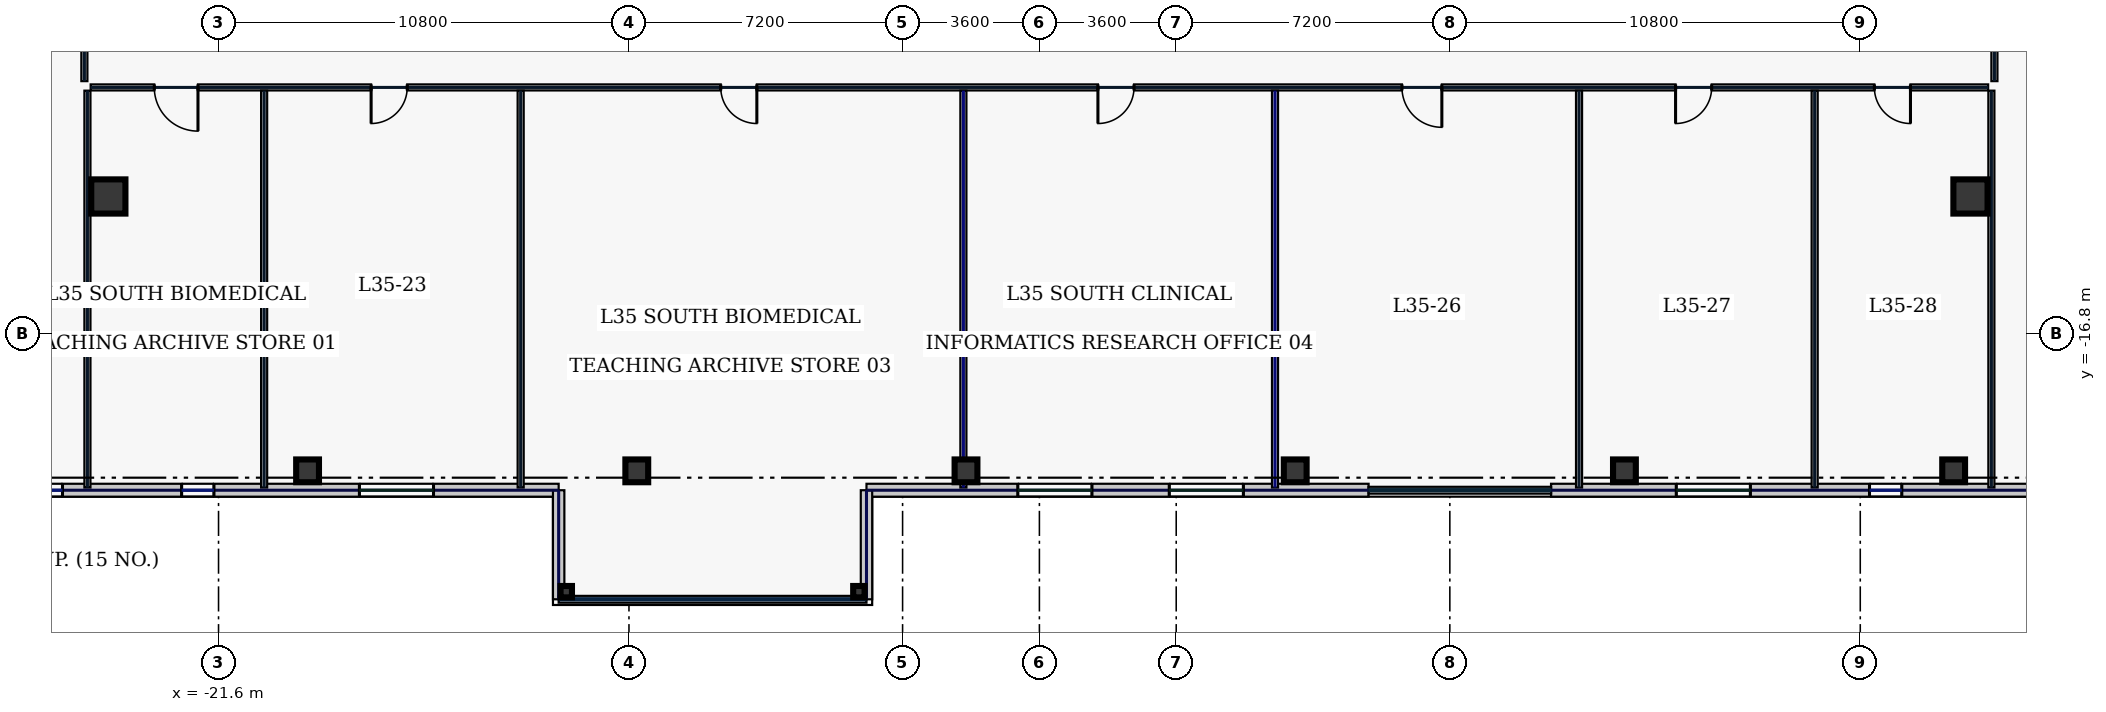
"""IFC4 building model, lengths in metres.
Left out: names, types, materials, properties, quantities, classifications, styles, units other than length and angle.
Written with IfcOpenShell. Run it as: python <this file> out.ifc"""

import sys

from ifc_helpers import new_model, si_unit, direction, frame, frame_2d, origin, origin_2d, place, context, subcontext, project, spatial, rectangle, hollow_rectangle, extrude, element, fill, save


model = new_model("IFC4")
c1 = context("Model", 3, precision=1e-05, world=origin(), true_north=direction((0.0, 1.0)))
c2 = subcontext(c1, "Body", "Model", "MODEL_VIEW")
j1 = project(units=[si_unit("LENGTHUNIT", "METRE"), si_unit("PLANEANGLEUNIT", "RADIAN")], contexts=[c1])
p1 = place(None, origin())
s1 = spatial("IfcSite", under=j1, at=p1, CompositionType="ELEMENT")
p2 = place(p1, origin())
s2 = spatial("IfcBuilding", under=s1, at=p2, CompositionType="ELEMENT")
p3 = place(p2, frame((0.0, 0.0, 156.2)))
s3 = spatial("IfcBuildingStorey", under=s2, at=p3, CompositionType="ELEMENT", Elevation=156.2)
for number, where, z_axis, x_axis in (
    (1, (-24.5, -13.2, 0.0), (0.0, 0.0, 1.0), (1.0, 0.0, 0.0)),
    (2, (24.5, -13.2, 0.0), (0.0, 0.0, 1.0), (1.0, 0.0, 0.0)),
):
    element("IfcColumn", number, at=place(p3, frame(where, z_axis=z_axis, x_axis=x_axis)), inside=s3, PredefinedType="COLUMN", context=c2, shape_type="SweptSolid", body=[
        extrude(hollow_rectangle(XDim=0.9, YDim=0.9, WallThickness=0.04, at=origin_2d()), origin(), (0.0, 0.0, 1.0), 3.74),
    ])
for number, where, z_axis, x_axis in (
    (3, (-19.257, -20.42, 0.0), (0.0, 0.0, 1.0), (1.0, 0.0, 0.0)),
    (4, (-10.594, -20.42, 0.0), (0.0, 0.0, 1.0), (1.0, 0.0, 0.0)),
    (5, (-1.931, -20.42, 0.0), (0.0, 0.0, 1.0), (1.0, 0.0, 0.0)),
    (6, (6.731, -20.42, 0.0), (0.0, 0.0, 1.0), (1.0, 0.0, 0.0)),
    (7, (15.394, -20.42, 0.0), (0.0, 0.0, 1.0), (1.0, 0.0, 0.0)),
    (8, (24.057, -20.42, 0.0), (0.0, 0.0, 1.0), (1.0, 0.0, 0.0)),
):
    element("IfcColumn", number, at=place(p3, frame(where, z_axis=z_axis, x_axis=x_axis)), inside=s3, PredefinedType="COLUMN", context=c2, shape_type="SweptSolid", body=[
        extrude(hollow_rectangle(XDim=0.6, YDim=0.6, WallThickness=0.028, at=origin_2d()), origin(), (0.0, 0.0, 1.0), 3.74),
    ])
for number, where, z_axis, x_axis in (
    (9, (-12.45, -23.6, 0.0), (0.0, 0.0, 1.0), (1.0, 0.0, 0.0)),
    (10, (-4.75, -23.6, 0.0), (0.0, 0.0, 1.0), (1.0, 0.0, 0.0)),
):
    element("IfcColumn", number, at=place(p3, frame(where, z_axis=z_axis, x_axis=x_axis)), inside=s3, PredefinedType="COLUMN", context=c2, shape_type="SweptSolid", body=[
        extrude(hollow_rectangle(XDim=0.3, YDim=0.3, WallThickness=0.016, at=origin_2d()), origin(), (0.0, 0.0, 1.0), 3.74),
    ])
p4 = place(p3, frame((-28.6, -20.93, 0.0), z_axis=(0.0, 0.0, 1.0), x_axis=(1.0, 0.0, 0.0)))
e11 = element("IfcWall", 11, at=p4, inside=s3, PredefinedType="STANDARD", context=c2, shape_type="SweptSolid", body=[
    extrude(rectangle(XDim=15.95, YDim=0.34, at=frame_2d((7.975, 0.0))), origin(), (0.0, 0.0, 1.0), 3.74),
])
p5 = place(p4, frame((2.044, 0.0, 0.8)))
e12 = element("IfcOpeningElement", 12, at=p5, cuts=e11, PredefinedType="OPENING", context=c2, shape_type="SweptSolid", body=[
    extrude(rectangle(XDim=0.85, YDim=1.85, at=frame_2d((0.425, 0.925))), frame((0.0, 0.18, 0.0), z_axis=(0.0, -1.0, 0.0), x_axis=(1.0, 0.0, 0.0)), (0.0, 0.0, 1.0), 0.36),
])
p6 = place(p4, frame((6.029, 0.0, 0.8)))
e13 = element("IfcOpeningElement", 13, at=p6, cuts=e11, PredefinedType="OPENING", context=c2, shape_type="SweptSolid", body=[
    extrude(rectangle(XDim=0.85, YDim=1.85, at=frame_2d((0.425, 0.925))), frame((0.0, 0.18, 0.0), z_axis=(0.0, -1.0, 0.0), x_axis=(1.0, 0.0, 0.0)), (0.0, 0.0, 1.0), 0.36),
])
p7 = place(p4, frame((10.707, 0.0, 0.8)))
e14 = element("IfcOpeningElement", 14, at=p7, cuts=e11, PredefinedType="OPENING", context=c2, shape_type="SweptSolid", body=[
    extrude(rectangle(XDim=1.95, YDim=2.1, at=frame_2d((0.975, 1.05))), frame((0.0, 0.18, 0.0), z_axis=(0.0, -1.0, 0.0), x_axis=(1.0, 0.0, 0.0)), (0.0, 0.0, 1.0), 0.36),
])
p8 = place(p3, frame((-4.55, -20.93, 0.0), z_axis=(0.0, 0.0, 1.0), x_axis=(1.0, 0.0, 0.0)))
e15 = element("IfcWall", 15, at=p8, inside=s3, PredefinedType="STANDARD", context=c2, shape_type="SweptSolid", body=[
    extrude(rectangle(XDim=13.213, YDim=0.34, at=frame_2d((6.606, 0.0))), origin(), (0.0, 0.0, 1.0), 3.74),
])
p9 = place(p8, frame((3.983, 0.0, 0.8)))
e16 = element("IfcOpeningElement", 16, at=p9, cuts=e15, PredefinedType="OPENING", context=c2, shape_type="SweptSolid", body=[
    extrude(rectangle(XDim=1.95, YDim=2.1, at=frame_2d((0.975, 1.05))), frame((0.0, 0.18, 0.0), z_axis=(0.0, -1.0, 0.0), x_axis=(1.0, 0.0, 0.0)), (0.0, 0.0, 1.0), 0.36),
])
p10 = place(p8, frame((7.967, 0.0, 0.8)))
e17 = element("IfcOpeningElement", 17, at=p10, cuts=e15, PredefinedType="OPENING", context=c2, shape_type="SweptSolid", body=[
    extrude(rectangle(XDim=1.95, YDim=2.1, at=frame_2d((0.975, 1.05))), frame((0.0, 0.18, 0.0), z_axis=(0.0, -1.0, 0.0), x_axis=(1.0, 0.0, 0.0)), (0.0, 0.0, 1.0), 0.36),
])
p11 = place(p3, frame((13.463, -20.93, 0.0), z_axis=(0.0, 0.0, 1.0), x_axis=(1.0, 0.0, 0.0)))
e18 = element("IfcWall", 18, at=p11, inside=s3, PredefinedType="STANDARD", context=c2, shape_type="SweptSolid", body=[
    extrude(rectangle(XDim=19.937, YDim=0.34, at=frame_2d((9.969, 0.0))), origin(), (0.0, 0.0, 1.0), 3.74),
])
p12 = place(p11, frame((3.295, 0.0, 0.8)))
e19 = element("IfcOpeningElement", 19, at=p12, cuts=e18, PredefinedType="OPENING", context=c2, shape_type="SweptSolid", body=[
    extrude(rectangle(XDim=1.95, YDim=2.1, at=frame_2d((0.975, 1.05))), frame((0.0, 0.18, 0.0), z_axis=(0.0, -1.0, 0.0), x_axis=(1.0, 0.0, 0.0)), (0.0, 0.0, 1.0), 0.36),
])
p13 = place(p11, frame((8.38, 0.0, 0.8)))
e20 = element("IfcOpeningElement", 20, at=p13, cuts=e18, PredefinedType="OPENING", context=c2, shape_type="SweptSolid", body=[
    extrude(rectangle(XDim=0.85, YDim=1.85, at=frame_2d((0.425, 0.925))), frame((0.0, 0.18, 0.0), z_axis=(0.0, -1.0, 0.0), x_axis=(1.0, 0.0, 0.0)), (0.0, 0.0, 1.0), 0.36),
])
p14 = place(p11, frame((13.058, 0.0, 0.8)))
e21 = element("IfcOpeningElement", 21, at=p14, cuts=e18, PredefinedType="OPENING", context=c2, shape_type="SweptSolid", body=[
    extrude(rectangle(XDim=0.85, YDim=1.85, at=frame_2d((0.425, 0.925))), frame((0.0, 0.18, 0.0), z_axis=(0.0, -1.0, 0.0), x_axis=(1.0, 0.0, 0.0)), (0.0, 0.0, 1.0), 0.36),
])
p15 = place(p11, frame((15.943, 0.0, 0.8)))
e22 = element("IfcOpeningElement", 22, at=p15, cuts=e18, PredefinedType="OPENING", context=c2, shape_type="SweptSolid", body=[
    extrude(rectangle(XDim=1.95, YDim=2.1, at=frame_2d((0.975, 1.05))), frame((0.0, 0.18, 0.0), z_axis=(0.0, -1.0, 0.0), x_axis=(1.0, 0.0, 0.0)), (0.0, 0.0, 1.0), 0.36),
])
for number, where, z_axis, x_axis in (
    (23, (-12.65, -20.93, 0.0), (0.0, 0.0, 1.0), (0.0, -1.0, 0.0)),
    (24, (-4.55, -20.93, 0.0), (0.0, 0.0, 1.0), (0.0, -1.0, 0.0)),
):
    element("IfcWall", number, at=place(p3, frame(where, z_axis=z_axis, x_axis=x_axis)), inside=s3, PredefinedType="STANDARD", context=c2, shape_type="SweptSolid", body=[
        extrude(rectangle(XDim=2.87, YDim=0.3, at=frame_2d((1.435, 0.0))), origin(), (0.0, 0.0, 1.0), 1.535),
    ])
p16 = place(p3, frame((-25.13, -10.165, 0.0), z_axis=(0.0, 0.0, 1.0), x_axis=(0.0, 1.0, 0.0)))
e25 = element("IfcWall", 25, at=p16, inside=s3, PredefinedType="PARTITIONING", context=c2, shape_type="SweptSolid", body=[
    extrude(rectangle(XDim=2.98, YDim=0.16, at=frame_2d((1.49, 0.0))), origin(), (0.0, 0.0, 1.0), 3.74),
])
p17 = place(p16, frame((1.1, 0.0, 0.0)))
e26 = element("IfcOpeningElement", 26, at=p17, cuts=e25, PredefinedType="OPENING", context=c2, shape_type="SweptSolid", body=[
    extrude(rectangle(XDim=0.95, YDim=2.2, at=frame_2d((0.475, 1.1))), frame((0.0, 0.09, 0.0), z_axis=(0.0, -1.0, 0.0), x_axis=(1.0, 0.0, 0.0)), (0.0, 0.0, 1.0), 0.18),
])
p18 = place(p3, frame((25.13, -7.185, 0.0), z_axis=(0.0, 0.0, 1.0), x_axis=(0.0, -1.0, 0.0)))
e27 = element("IfcWall", 27, at=p18, inside=s3, PredefinedType="PARTITIONING", context=c2, shape_type="SweptSolid", body=[
    extrude(rectangle(XDim=2.98, YDim=0.16, at=frame_2d((1.49, 0.0))), origin(), (0.0, 0.0, 1.0), 3.74),
])
p19 = place(p18, frame((1.1, 0.0, 0.0)))
e28 = element("IfcOpeningElement", 28, at=p19, cuts=e27, PredefinedType="OPENING", context=c2, shape_type="SweptSolid", body=[
    extrude(rectangle(XDim=0.95, YDim=2.2, at=frame_2d((0.475, 1.1))), frame((0.0, 0.09, 0.0), z_axis=(0.0, -1.0, 0.0), x_axis=(1.0, 0.0, 0.0)), (0.0, 0.0, 1.0), 0.18),
])
p20 = place(p3, frame((24.965, -10.33, 0.0), z_axis=(0.0, 0.0, 1.0), x_axis=(-1.0, 0.0, 0.0)))
e29 = element("IfcWall", 29, at=p20, inside=s3, PredefinedType="PARTITIONING", context=c2, shape_type="SweptSolid", body=[
    extrude(rectangle(XDim=49.93, YDim=0.16, at=frame_2d((24.965, 0.0))), origin(), (0.0, 0.0, 1.0), 3.74),
])
p21 = place(p20, frame((47.106, 0.0, 0.0)))
e30 = element("IfcOpeningElement", 30, at=p21, cuts=e29, PredefinedType="OPENING", context=c2, shape_type="SweptSolid", body=[
    extrude(rectangle(XDim=1.15, YDim=2.2, at=frame_2d((0.575, 1.1))), frame((0.0, 0.09, 0.0), z_axis=(0.0, -1.0, 0.0), x_axis=(1.0, 0.0, 0.0)), (0.0, 0.0, 1.0), 0.18),
])
p22 = place(p20, frame((41.6, 0.0, 0.0)))
e31 = element("IfcOpeningElement", 31, at=p22, cuts=e29, PredefinedType="OPENING", context=c2, shape_type="SweptSolid", body=[
    extrude(rectangle(XDim=0.95, YDim=2.2, at=frame_2d((0.475, 1.1))), frame((0.0, 0.09, 0.0), z_axis=(0.0, -1.0, 0.0), x_axis=(1.0, 0.0, 0.0)), (0.0, 0.0, 1.0), 0.18),
])
p23 = place(p20, frame((32.4, 0.0, 0.0)))
e32 = element("IfcOpeningElement", 32, at=p23, cuts=e29, PredefinedType="OPENING", context=c2, shape_type="SweptSolid", body=[
    extrude(rectangle(XDim=0.95, YDim=2.2, at=frame_2d((0.475, 1.1))), frame((0.0, 0.09, 0.0), z_axis=(0.0, -1.0, 0.0), x_axis=(1.0, 0.0, 0.0)), (0.0, 0.0, 1.0), 0.18),
])
p24 = place(p20, frame((22.475, 0.0, 0.0)))
e33 = element("IfcOpeningElement", 33, at=p24, cuts=e29, PredefinedType="OPENING", context=c2, shape_type="SweptSolid", body=[
    extrude(rectangle(XDim=0.95, YDim=2.2, at=frame_2d((0.475, 1.1))), frame((0.0, 0.09, 0.0), z_axis=(0.0, -1.0, 0.0), x_axis=(1.0, 0.0, 0.0)), (0.0, 0.0, 1.0), 0.18),
])
p25 = place(p20, frame((14.375, 0.0, 0.0)))
e34 = element("IfcOpeningElement", 34, at=p25, cuts=e29, PredefinedType="OPENING", context=c2, shape_type="SweptSolid", body=[
    extrude(rectangle(XDim=1.05, YDim=2.2, at=frame_2d((0.525, 1.1))), frame((0.0, 0.09, 0.0), z_axis=(0.0, -1.0, 0.0), x_axis=(1.0, 0.0, 0.0)), (0.0, 0.0, 1.0), 0.18),
])
p26 = place(p20, frame((7.275, 0.0, 0.0)))
e35 = element("IfcOpeningElement", 35, at=p26, cuts=e29, PredefinedType="OPENING", context=c2, shape_type="SweptSolid", body=[
    extrude(rectangle(XDim=0.95, YDim=2.2, at=frame_2d((0.475, 1.1))), frame((0.0, 0.09, 0.0), z_axis=(0.0, -1.0, 0.0), x_axis=(1.0, 0.0, 0.0)), (0.0, 0.0, 1.0), 0.18),
])
p27 = place(p20, frame((2.044, 0.0, 0.0)))
e36 = element("IfcOpeningElement", 36, at=p27, cuts=e29, PredefinedType="OPENING", context=c2, shape_type="SweptSolid", body=[
    extrude(rectangle(XDim=0.95, YDim=2.2, at=frame_2d((0.475, 1.1))), frame((0.0, 0.09, 0.0), z_axis=(0.0, -1.0, 0.0), x_axis=(1.0, 0.0, 0.0)), (0.0, 0.0, 1.0), 0.18),
])
for number, where, z_axis, x_axis in (
    (37, (-25.05, -20.86, 0.0), (0.0, 0.0, 1.0), (0.0, 1.0, 0.0)),
    (38, (25.05, -20.86, 0.0), (0.0, 0.0, 1.0), (0.0, 1.0, 0.0)),
    (39, (-20.4, -20.86, 0.0), (0.0, 0.0, 1.0), (0.0, 1.0, 0.0)),
    (40, (-13.65, -20.86, 0.0), (0.0, 0.0, 1.0), (0.0, 1.0, 0.0)),
):
    element("IfcWall", number, at=place(p3, frame(where, z_axis=z_axis, x_axis=x_axis)), inside=s3, PredefinedType="PARTITIONING", context=c2, shape_type="SweptSolid", body=[
        extrude(rectangle(XDim=10.445, YDim=0.16, at=frame_2d((5.223, 0.0))), origin(), (0.0, 0.0, 1.0), 3.74),
    ])
for number, where, z_axis, x_axis in (
    (41, (-2.0, -20.86, 0.0), (0.0, 0.0, 1.0), (0.0, 1.0, 0.0)),
    (42, (6.2, -20.86, 0.0), (0.0, 0.0, 1.0), (0.0, 1.0, 0.0)),
):
    element("IfcWall", number, at=place(p3, frame(where, z_axis=z_axis, x_axis=x_axis)), inside=s3, PredefinedType="PARTITIONING", context=c2, shape_type="SweptSolid", body=[
        extrude(rectangle(XDim=10.445, YDim=0.16, at=frame_2d((5.223, 0.0))), origin(), (0.0, 0.0, 1.0), 3.285),
    ])
for number, where, z_axis, x_axis in (
    (43, (14.2, -20.86, 0.0), (0.0, 0.0, 1.0), (0.0, 1.0, 0.0)),
    (44, (20.4, -20.86, 0.0), (0.0, 0.0, 1.0), (0.0, 1.0, 0.0)),
):
    element("IfcWall", number, at=place(p3, frame(where, z_axis=z_axis, x_axis=x_axis)), inside=s3, PredefinedType="PARTITIONING", context=c2, shape_type="SweptSolid", body=[
        extrude(rectangle(XDim=10.445, YDim=0.16, at=frame_2d((5.223, 0.0))), origin(), (0.0, 0.0, 1.0), 3.74),
    ])
p28 = place(p5, origin())
e45 = element("IfcWindow", 45, at=p28, inside=s3, PartitioningType="SINGLE_PANEL", PredefinedType="WINDOW", context=c2, shape_type="SweptSolid", body=[
    extrude(rectangle(XDim=0.85, YDim=1.85, at=frame_2d((0.425, 0.925))), frame((0.0, 0.03, 0.0), z_axis=(0.0, -1.0, 0.0), x_axis=(1.0, 0.0, 0.0)), (0.0, 0.0, 1.0), 0.06),
])
fill(e12, e45)
p29 = place(p6, origin())
e46 = element("IfcWindow", 46, at=p29, inside=s3, PartitioningType="SINGLE_PANEL", PredefinedType="WINDOW", context=c2, shape_type="SweptSolid", body=[
    extrude(rectangle(XDim=0.85, YDim=1.85, at=frame_2d((0.425, 0.925))), frame((0.0, 0.03, 0.0), z_axis=(0.0, -1.0, 0.0), x_axis=(1.0, 0.0, 0.0)), (0.0, 0.0, 1.0), 0.06),
])
fill(e13, e46)
p30 = place(p7, origin())
e47 = element("IfcWindow", 47, at=p30, inside=s3, PartitioningType="SINGLE_PANEL", PredefinedType="WINDOW", context=c2, shape_type="SweptSolid", body=[
    extrude(rectangle(XDim=1.95, YDim=2.1, at=frame_2d((0.975, 1.05))), frame((0.0, 0.03, 0.0), z_axis=(0.0, -1.0, 0.0), x_axis=(1.0, 0.0, 0.0)), (0.0, 0.0, 1.0), 0.06),
])
fill(e14, e47)
p31 = place(p9, origin())
e48 = element("IfcWindow", 48, at=p31, inside=s3, PartitioningType="SINGLE_PANEL", PredefinedType="WINDOW", context=c2, shape_type="SweptSolid", body=[
    extrude(rectangle(XDim=1.95, YDim=2.1, at=frame_2d((0.975, 1.05))), frame((0.0, 0.03, 0.0), z_axis=(0.0, -1.0, 0.0), x_axis=(1.0, 0.0, 0.0)), (0.0, 0.0, 1.0), 0.06),
])
fill(e16, e48)
p32 = place(p10, origin())
e49 = element("IfcWindow", 49, at=p32, inside=s3, PartitioningType="SINGLE_PANEL", PredefinedType="WINDOW", context=c2, shape_type="SweptSolid", body=[
    extrude(rectangle(XDim=1.95, YDim=2.1, at=frame_2d((0.975, 1.05))), frame((0.0, 0.03, 0.0), z_axis=(0.0, -1.0, 0.0), x_axis=(1.0, 0.0, 0.0)), (0.0, 0.0, 1.0), 0.06),
])
fill(e17, e49)
p33 = place(p12, origin())
e50 = element("IfcWindow", 50, at=p33, inside=s3, PartitioningType="SINGLE_PANEL", PredefinedType="WINDOW", context=c2, shape_type="SweptSolid", body=[
    extrude(rectangle(XDim=1.95, YDim=2.1, at=frame_2d((0.975, 1.05))), frame((0.0, 0.03, 0.0), z_axis=(0.0, -1.0, 0.0), x_axis=(1.0, 0.0, 0.0)), (0.0, 0.0, 1.0), 0.06),
])
fill(e19, e50)
p34 = place(p13, origin())
e51 = element("IfcWindow", 51, at=p34, inside=s3, PartitioningType="SINGLE_PANEL", PredefinedType="WINDOW", context=c2, shape_type="SweptSolid", body=[
    extrude(rectangle(XDim=0.85, YDim=1.85, at=frame_2d((0.425, 0.925))), frame((0.0, 0.03, 0.0), z_axis=(0.0, -1.0, 0.0), x_axis=(1.0, 0.0, 0.0)), (0.0, 0.0, 1.0), 0.06),
])
fill(e20, e51)
p35 = place(p21, origin())
e52 = element("IfcDoor", 52, at=p35, inside=s3, OperationType="SINGLE_SWING_LEFT", PredefinedType="DOOR", context=c2, shape_type="SweptSolid", body=[
    extrude(rectangle(XDim=1.15, YDim=2.2, at=frame_2d((0.575, 1.1))), frame((0.0, 0.025, 0.0), z_axis=(0.0, -1.0, 0.0), x_axis=(1.0, 0.0, 0.0)), (0.0, 0.0, 1.0), 0.05),
])
fill(e30, e52)
p36 = place(p22, origin())
e53 = element("IfcDoor", 53, at=p36, inside=s3, OperationType="SINGLE_SWING_RIGHT", PredefinedType="DOOR", context=c2, shape_type="SweptSolid", body=[
    extrude(rectangle(XDim=0.95, YDim=2.2, at=frame_2d((0.475, 1.1))), frame((0.0, 0.025, 0.0), z_axis=(0.0, -1.0, 0.0), x_axis=(1.0, 0.0, 0.0)), (0.0, 0.0, 1.0), 0.05),
])
fill(e31, e53)
p37 = place(p23, origin())
e54 = element("IfcDoor", 54, at=p37, inside=s3, OperationType="SINGLE_SWING_LEFT", PredefinedType="DOOR", context=c2, shape_type="SweptSolid", body=[
    extrude(rectangle(XDim=0.95, YDim=2.2, at=frame_2d((0.475, 1.1))), frame((0.0, 0.025, 0.0), z_axis=(0.0, -1.0, 0.0), x_axis=(1.0, 0.0, 0.0)), (0.0, 0.0, 1.0), 0.05),
])
fill(e32, e54)
p38 = place(p24, origin())
e55 = element("IfcDoor", 55, at=p38, inside=s3, OperationType="SINGLE_SWING_RIGHT", PredefinedType="DOOR", context=c2, shape_type="SweptSolid", body=[
    extrude(rectangle(XDim=0.95, YDim=2.2, at=frame_2d((0.475, 1.1))), frame((0.0, 0.025, 0.0), z_axis=(0.0, -1.0, 0.0), x_axis=(1.0, 0.0, 0.0)), (0.0, 0.0, 1.0), 0.05),
])
fill(e33, e55)
p39 = place(p25, origin())
e56 = element("IfcDoor", 56, at=p39, inside=s3, OperationType="SINGLE_SWING_LEFT", PredefinedType="DOOR", context=c2, shape_type="SweptSolid", body=[
    extrude(rectangle(XDim=1.05, YDim=2.2, at=frame_2d((0.525, 1.1))), frame((0.0, 0.025, 0.0), z_axis=(0.0, -1.0, 0.0), x_axis=(1.0, 0.0, 0.0)), (0.0, 0.0, 1.0), 0.05),
])
fill(e34, e56)
p40 = place(p26, origin())
e57 = element("IfcDoor", 57, at=p40, inside=s3, OperationType="SINGLE_SWING_RIGHT", PredefinedType="DOOR", context=c2, shape_type="SweptSolid", body=[
    extrude(rectangle(XDim=0.95, YDim=2.2, at=frame_2d((0.475, 1.1))), frame((0.0, 0.025, 0.0), z_axis=(0.0, -1.0, 0.0), x_axis=(1.0, 0.0, 0.0)), (0.0, 0.0, 1.0), 0.05),
])
fill(e35, e57)
p41 = place(p27, origin())
e58 = element("IfcDoor", 58, at=p41, inside=s3, OperationType="SINGLE_SWING_LEFT", PredefinedType="DOOR", context=c2, shape_type="SweptSolid", body=[
    extrude(rectangle(XDim=0.95, YDim=2.2, at=frame_2d((0.475, 1.1))), frame((0.0, 0.025, 0.0), z_axis=(0.0, -1.0, 0.0), x_axis=(1.0, 0.0, 0.0)), (0.0, 0.0, 1.0), 0.05),
])
fill(e36, e58)
save(model, sys.argv[1])
